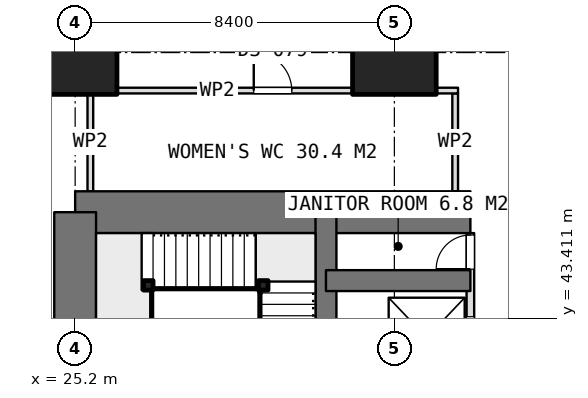
"""IFC4 building model, lengths in metres.
Left out: names, types, materials, properties, quantities, classifications, styles, units other than length and angle.
Written with IfcOpenShell. Run it as: python <this file> out.ifc"""

import sys

from ifc_helpers import new_model, si_unit, direction, frame, frame_2d, origin, origin_2d, place, context, subcontext, project, spatial, rectangle, extrude, element, fill, save


model = new_model("IFC4")
c1 = context("Model", 3, precision=1e-05, world=origin(), true_north=direction((0.0, 1.0)))
c2 = subcontext(c1, "Body", "Model", "MODEL_VIEW")
j1 = project(units=[si_unit("LENGTHUNIT", "METRE"), si_unit("PLANEANGLEUNIT", "RADIAN")], contexts=[c1])
p1 = place(None, origin())
s1 = spatial("IfcSite", under=j1, at=p1, CompositionType="ELEMENT")
p2 = place(p1, origin())
s2 = spatial("IfcBuilding", under=s1, at=p2, CompositionType="ELEMENT")
p3 = place(p2, frame((0.0, 0.0, 70.4)))
s3 = spatial("IfcBuildingStorey", under=s2, at=p3, CompositionType="ELEMENT", Elevation=70.4)
p4 = place(p3, frame((25.2, 46.2, 0.0), z_axis=(0.0, 0.0, 1.0), x_axis=(1.0, 0.0, 0.0)))
e1 = element("IfcWall", 1, at=p4, inside=s3, PredefinedType="SHEAR", context=c2, shape_type="SweptSolid", body=[
    extrude(rectangle(XDim=10.4, YDim=1.1, at=frame_2d((5.2, 0.0))), origin(), (0.0, 0.0, 1.0), 3.75),
])
p5 = place(p3, frame((25.2, 21.0, 0.0), z_axis=(0.0, 0.0, 1.0), x_axis=(0.0, 1.0, 0.0)))
e2 = element("IfcWall", 2, at=p5, inside=s3, PredefinedType="SHEAR", context=c2, shape_type="SweptSolid", body=[
    extrude(rectangle(XDim=25.2, YDim=1.1, at=frame_2d((12.6, 0.0))), origin(), (0.0, 0.0, 1.0), 3.75),
])
p6 = place(p5, frame((7.8, 0.0, 0.0)))
e3 = element("IfcOpeningElement", 3, at=p6, cuts=e2, PredefinedType="OPENING", context=c2, shape_type="SweptSolid", body=[
    extrude(rectangle(XDim=1.2, YDim=2.1, at=frame_2d((0.6, 1.05))), frame((0.0, 0.56, 0.0), z_axis=(0.0, -1.0, 0.0), x_axis=(1.0, 0.0, 0.0)), (0.0, 0.0, 1.0), 1.12),
])
p7 = place(p5, frame((14.25, 0.0, 0.0)))
e4 = element("IfcOpeningElement", 4, at=p7, cuts=e2, PredefinedType="OPENING", context=c2, shape_type="SweptSolid", body=[
    extrude(rectangle(XDim=0.9, YDim=2.1, at=frame_2d((0.45, 1.05))), frame((0.0, 0.56, 0.0), z_axis=(0.0, -1.0, 0.0), x_axis=(1.0, 0.0, 0.0)), (0.0, 0.0, 1.0), 1.12),
])
p8 = place(p5, frame((16.85, 0.0, 0.0)))
e5 = element("IfcOpeningElement", 5, at=p8, cuts=e2, PredefinedType="OPENING", context=c2, shape_type="SweptSolid", body=[
    extrude(rectangle(XDim=0.9, YDim=2.1, at=frame_2d((0.45, 1.05))), frame((0.0, 0.56, 0.0), z_axis=(0.0, -1.0, 0.0), x_axis=(1.0, 0.0, 0.0)), (0.0, 0.0, 1.0), 1.12),
])
p9 = place(p5, frame((19.075, 0.0, 0.0)))
e6 = element("IfcOpeningElement", 6, at=p9, cuts=e2, PredefinedType="OPENING", context=c2, shape_type="SweptSolid", body=[
    extrude(rectangle(XDim=1.2, YDim=2.1, at=frame_2d((0.6, 1.05))), frame((0.0, 0.56, 0.0), z_axis=(0.0, -1.0, 0.0), x_axis=(1.0, 0.0, 0.0)), (0.0, 0.0, 1.0), 1.12),
])
p10 = place(p3, frame((31.8, 21.0, 0.0), z_axis=(0.0, 0.0, 1.0), x_axis=(0.0, 1.0, 0.0)))
e7 = element("IfcWall", 7, at=p10, inside=s3, PredefinedType="SHEAR", context=c2, shape_type="SweptSolid", body=[
    extrude(rectangle(XDim=25.2, YDim=0.55, at=frame_2d((12.6, 0.0))), origin(), (0.0, 0.0, 1.0), 3.75),
])
p11 = place(p3, frame((31.8, 44.4, 0.0), z_axis=(0.0, 0.0, 1.0), x_axis=(1.0, 0.0, 0.0)))
e8 = element("IfcWall", 8, at=p11, inside=s3, PredefinedType="SHEAR", context=c2, shape_type="SweptSolid", body=[
    extrude(rectangle(XDim=3.8, YDim=0.55, at=frame_2d((1.9, 0.0))), origin(), (0.0, 0.0, 1.0), 3.75),
])
for number, where, z_axis, x_axis in (
    (9, (25.2, 50.4, 0.0), (0.0, 0.0, 1.0), (1.0, 0.0, 0.0)),
    (10, (33.6, 50.4, 0.0), (0.0, 0.0, 1.0), (1.0, 0.0, 0.0)),
):
    element("IfcColumn", number, at=place(p3, frame(where, z_axis=z_axis, x_axis=x_axis)), inside=s3, PredefinedType="COLUMN", context=c2, shape_type="SweptSolid", body=[
        extrude(rectangle(XDim=2.2, YDim=2.2, at=origin_2d()), origin(), (0.0, 0.0, 1.0), 3.75),
    ])
p12 = place(p3, frame((35.6, 41.675, 0.0), z_axis=(0.0, 0.0, 1.0), x_axis=(0.0, 1.0, 0.0)))
e11 = element("IfcWall", 11, at=p12, inside=s3, PredefinedType="PARTITIONING", context=c2, shape_type="SweptSolid", body=[
    extrude(rectangle(XDim=3.975, YDim=0.2, at=frame_2d((1.987, 0.0))), origin(), (0.0, 0.0, 1.0), 3.5),
])
p13 = place(p12, frame((3.025, 0.0, 0.0)))
e12 = element("IfcOpeningElement", 12, at=p13, cuts=e11, PredefinedType="OPENING", context=c2, shape_type="SweptSolid", body=[
    extrude(rectangle(XDim=0.9, YDim=2.1, at=frame_2d((0.45, 1.05))), frame((0.0, 0.11, 0.0), z_axis=(0.0, -1.0, 0.0), x_axis=(1.0, 0.0, 0.0)), (0.0, 0.0, 1.0), 0.22),
])
p14 = place(p12, frame((0.675, 0.0, 0.0)))
e13 = element("IfcOpeningElement", 13, at=p14, cuts=e11, PredefinedType="OPENING", context=c2, shape_type="SweptSolid", body=[
    extrude(rectangle(XDim=1.1, YDim=2.1, at=frame_2d((0.55, 1.05))), frame((0.0, 0.11, 0.0), z_axis=(0.0, -1.0, 0.0), x_axis=(1.0, 0.0, 0.0)), (0.0, 0.0, 1.0), 0.22),
])
p15 = place(p3, frame((25.525, 49.4, 0.0), z_axis=(0.0, 0.0, 1.0), x_axis=(1.0, 0.0, 0.0)))
e14 = element("IfcWall", 14, at=p15, inside=s3, PredefinedType="PARTITIONING", context=c2, shape_type="SweptSolid", body=[
    extrude(rectangle(XDim=9.75, YDim=0.15, at=frame_2d((4.875, 0.0))), origin(), (0.0, 0.0, 1.0), 3.5),
])
p16 = place(p15, frame((4.375, 0.0, 0.0)))
e15 = element("IfcOpeningElement", 15, at=p16, cuts=e14, PredefinedType="OPENING", context=c2, shape_type="SweptSolid", body=[
    extrude(rectangle(XDim=1.0, YDim=2.1, at=frame_2d((0.5, 1.05))), frame((0.0, 0.085, 0.0), z_axis=(0.0, -1.0, 0.0), x_axis=(1.0, 0.0, 0.0)), (0.0, 0.0, 1.0), 0.17),
])
for number, where, z_axis, x_axis in (
    (16, (25.6, 46.75, 0.0), (0.0, 0.0, 1.0), (0.0, 1.0, 0.0)),
    (17, (35.2, 46.75, 0.0), (0.0, 0.0, 1.0), (0.0, 1.0, 0.0)),
):
    element("IfcWall", number, at=place(p3, frame(where, z_axis=z_axis, x_axis=x_axis)), inside=s3, PredefinedType="PARTITIONING", context=c2, shape_type="SweptSolid", body=[
        extrude(rectangle(XDim=2.575, YDim=0.15, at=frame_2d((1.288, 0.0))), origin(), (0.0, 0.0, 1.0), 3.5),
    ])
for number, where, z_axis, x_axis in (
    (18, (30.15, 44.275, 0.0), (0.0, 0.0, 1.0), (1.0, 0.0, 0.0)),
    (19, (27.125, 44.275, 0.0), (0.0, 0.0, 1.0), (1.0, 0.0, 0.0)),
):
    element("IfcColumn", number, at=place(p3, frame(where, z_axis=z_axis, x_axis=x_axis)), inside=s3, PredefinedType="COLUMN", context=c2, shape_type="SweptSolid", body=[
        extrude(rectangle(XDim=0.25, YDim=0.25, at=origin_2d()), origin(), (0.0, 0.0, 1.0), 3.75),
    ])
p17 = place(p13, origin())
e20 = element("IfcDoor", 20, at=p17, inside=s3, OperationType="SINGLE_SWING_LEFT", PredefinedType="DOOR", context=c2, shape_type="SweptSolid", body=[
    extrude(rectangle(XDim=0.9, YDim=2.1, at=frame_2d((0.45, 1.05))), frame((0.0, 0.025, 0.0), z_axis=(0.0, -1.0, 0.0), x_axis=(1.0, 0.0, 0.0)), (0.0, 0.0, 1.0), 0.05),
])
fill(e12, e20)
p18 = place(p14, origin())
e21 = element("IfcDoor", 21, at=p18, inside=s3, OperationType="SLIDING_TO_LEFT", PredefinedType="USERDEFINED", context=c2, shape_type="SweptSolid", body=[
    extrude(rectangle(XDim=1.1, YDim=2.1, at=frame_2d((0.55, 1.05))), frame((0.0, 0.025, 0.0), z_axis=(0.0, -1.0, 0.0), x_axis=(1.0, 0.0, 0.0)), (0.0, 0.0, 1.0), 0.05),
])
fill(e13, e21)
p19 = place(p16, origin())
e22 = element("IfcDoor", 22, at=p19, inside=s3, OperationType="SINGLE_SWING_LEFT", PredefinedType="DOOR", context=c2, shape_type="SweptSolid", body=[
    extrude(rectangle(XDim=1.0, YDim=2.1, at=frame_2d((0.5, 1.05))), frame((0.0, 0.025, 0.0), z_axis=(0.0, -1.0, 0.0), x_axis=(1.0, 0.0, 0.0)), (0.0, 0.0, 1.0), 0.05),
])
fill(e15, e22)
save(model, sys.argv[1])
